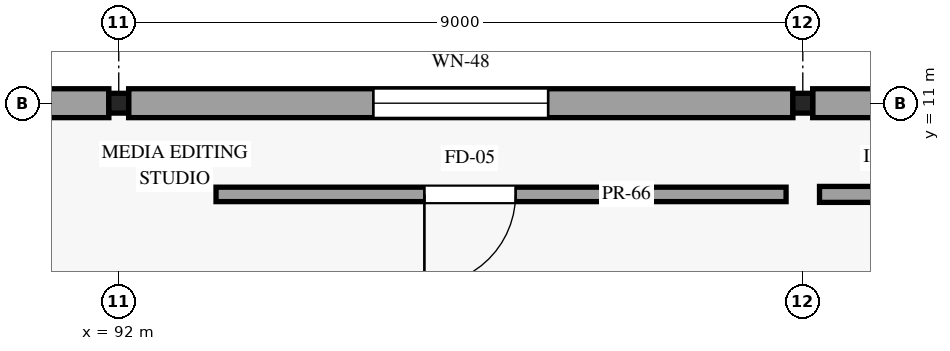
"""IFC4 building model, lengths in metres.
Left out: names, types, materials, properties, quantities, classifications, styles, units other than length and angle.
Written with IfcOpenShell. Run it as: python <this file> out.ifc"""

import sys

from ifc_helpers import new_model, si_unit, direction, frame, frame_2d, origin, origin_2d, place, context, subcontext, project, spatial, rectangle, i_section, extrude, element, fill, save


model = new_model("IFC4")
c1 = context("Model", 3, precision=1e-05, world=origin(), true_north=direction((0.0, 1.0)))
c2 = subcontext(c1, "Body", "Model", "MODEL_VIEW")
j1 = project(units=[si_unit("LENGTHUNIT", "METRE"), si_unit("PLANEANGLEUNIT", "RADIAN")], contexts=[c1])
p1 = place(None, origin())
s1 = spatial("IfcSite", under=j1, at=p1, CompositionType="ELEMENT")
p2 = place(p1, origin())
s2 = spatial("IfcBuilding", under=s1, at=p2, CompositionType="ELEMENT")
p3 = place(p2, frame((0.0, 0.0, 10.2)))
s3 = spatial("IfcBuildingStorey", under=s2, at=p3, CompositionType="ELEMENT", Elevation=10.2)
for number, where, z_axis, x_axis in (
    (1, (92.0, 11.0, 0.0), (0.0, 0.0, 1.0), (1.0, 0.0, 0.0)),
    (2, (101.0, 11.0, 0.0), (0.0, 0.0, 1.0), (1.0, 0.0, 0.0)),
):
    element("IfcColumn", number, at=place(p3, frame(where, z_axis=z_axis, x_axis=x_axis)), inside=s3, PredefinedType="COLUMN", context=c2, shape_type="SweptSolid", body=[
        extrude(i_section(OverallWidth=0.26, OverallDepth=0.26, WebThickness=0.01, FlangeThickness=0.018, FilletRadius=0.024, at=origin_2d()), origin(), (0.0, 0.0, 1.0), 4.8),
    ])
p4 = place(p3, frame((83.13, 11.0, 0.0), z_axis=(0.0, 0.0, 1.0), x_axis=(1.0, 0.0, 0.0)))
e3 = element("IfcWall", 3, at=p4, inside=s3, PredefinedType="STANDARD", context=c2, shape_type="SweptSolid", body=[
    extrude(rectangle(XDim=8.74, YDim=0.38, at=frame_2d((4.37, 0.0))), origin(), (0.0, 0.0, 1.0), 4.155),
])
p5 = place(p4, frame((3.32, 0.0, 0.85)))
e4 = element("IfcOpeningElement", 4, at=p5, cuts=e3, PredefinedType="OPENING", context=c2, shape_type="SweptSolid", body=[
    extrude(rectangle(XDim=2.1, YDim=2.45, at=frame_2d((1.05, 1.225))), frame((0.0, 0.2, 0.0), z_axis=(0.0, -1.0, 0.0), x_axis=(1.0, 0.0, 0.0)), (0.0, 0.0, 1.0), 0.4),
])
p6 = place(p3, frame((92.13, 11.0, 0.0), z_axis=(0.0, 0.0, 1.0), x_axis=(1.0, 0.0, 0.0)))
e5 = element("IfcWall", 5, at=p6, inside=s3, PredefinedType="STANDARD", context=c2, shape_type="SweptSolid", body=[
    extrude(rectangle(XDim=8.74, YDim=0.38, at=frame_2d((4.37, 0.0))), origin(), (0.0, 0.0, 1.0), 4.155),
])
p7 = place(p6, frame((3.22, 0.0, 0.85)))
e6 = element("IfcOpeningElement", 6, at=p7, cuts=e5, PredefinedType="OPENING", context=c2, shape_type="SweptSolid", body=[
    extrude(rectangle(XDim=2.3, YDim=2.5, at=frame_2d((1.15, 1.25))), frame((0.0, 0.2, 0.0), z_axis=(0.0, -1.0, 0.0), x_axis=(1.0, 0.0, 0.0)), (0.0, 0.0, 1.0), 0.4),
])
p8 = place(p3, frame((101.13, 11.0, 0.0), z_axis=(0.0, 0.0, 1.0), x_axis=(1.0, 0.0, 0.0)))
e7 = element("IfcWall", 7, at=p8, inside=s3, PredefinedType="STANDARD", context=c2, shape_type="SweptSolid", body=[
    extrude(rectangle(XDim=8.74, YDim=0.38, at=frame_2d((4.37, 0.0))), origin(), (0.0, 0.0, 1.0), 4.155),
])
p9 = place(p8, frame((3.12, 0.0, 0.85)))
e8 = element("IfcOpeningElement", 8, at=p9, cuts=e7, PredefinedType="OPENING", context=c2, shape_type="SweptSolid", body=[
    extrude(rectangle(XDim=2.5, YDim=2.15, at=frame_2d((1.25, 1.075))), frame((0.0, 0.2, 0.0), z_axis=(0.0, -1.0, 0.0), x_axis=(1.0, 0.0, 0.0)), (0.0, 0.0, 1.0), 0.4),
])
p10 = place(p3, frame((93.28, 9.8, 0.0), z_axis=(0.0, 0.0, 1.0), x_axis=(1.0, 0.0, 0.0)))
e9 = element("IfcWall", 9, at=p10, inside=s3, PredefinedType="PARTITIONING", context=c2, shape_type="SweptSolid", body=[
    extrude(rectangle(XDim=7.5, YDim=0.19, at=frame_2d((3.75, 0.0))), origin(), (0.0, 0.0, 1.0), 4.155),
])
p11 = place(p10, frame((3.941, 0.0, 0.0), z_axis=(0.0, 0.0, 1.0), x_axis=(-1.0, 0.0, 0.0)))
e10 = element("IfcOpeningElement", 10, at=p11, cuts=e9, PredefinedType="OPENING", context=c2, shape_type="SweptSolid", body=[
    extrude(rectangle(XDim=1.2, YDim=2.3, at=frame_2d((0.6, 1.15))), frame((0.0, 0.105, 0.0), z_axis=(0.0, -1.0, 0.0), x_axis=(1.0, 0.0, 0.0)), (0.0, 0.0, 1.0), 0.21),
])
p12 = place(p3, frame((101.22, 9.8, 0.0), z_axis=(0.0, 0.0, 1.0), x_axis=(1.0, 0.0, 0.0)))
e11 = element("IfcWall", 11, at=p12, inside=s3, PredefinedType="PARTITIONING", context=c2, shape_type="SweptSolid", body=[
    extrude(rectangle(XDim=8.56, YDim=0.21, at=frame_2d((4.28, 0.0))), origin(), (0.0, 0.0, 1.0), 4.155),
])
p13 = place(p12, frame((5.35, 0.0, 0.0), z_axis=(0.0, 0.0, 1.0), x_axis=(-1.0, 0.0, 0.0)))
e12 = element("IfcOpeningElement", 12, at=p13, cuts=e11, PredefinedType="OPENING", context=c2, shape_type="SweptSolid", body=[
    extrude(rectangle(XDim=1.82, YDim=2.46, at=frame_2d((0.91, 1.23))), frame((0.0, 0.115, 0.0), z_axis=(0.0, -1.0, 0.0), x_axis=(1.0, 0.0, 0.0)), (0.0, 0.0, 1.0), 0.23),
])
p14 = place(p7, origin())
e13 = element("IfcWindow", 13, at=p14, inside=s3, PartitioningType="SINGLE_PANEL", PredefinedType="WINDOW", context=c2, shape_type="SweptSolid", body=[
    extrude(rectangle(XDim=2.3, YDim=2.5, at=frame_2d((1.15, 1.25))), frame((0.0, 0.03, 0.0), z_axis=(0.0, -1.0, 0.0), x_axis=(1.0, 0.0, 0.0)), (0.0, 0.0, 1.0), 0.06),
])
fill(e6, e13)
p15 = place(p11, origin())
e14 = element("IfcDoor", 14, at=p15, inside=s3, OperationType="SINGLE_SWING_RIGHT", PredefinedType="DOOR", context=c2, shape_type="SweptSolid", body=[
    extrude(rectangle(XDim=1.2, YDim=2.3, at=frame_2d((0.6, 1.15))), frame((0.0, 0.025, 0.0), z_axis=(0.0, -1.0, 0.0), x_axis=(1.0, 0.0, 0.0)), (0.0, 0.0, 1.0), 0.05),
])
fill(e10, e14)
save(model, sys.argv[1])
